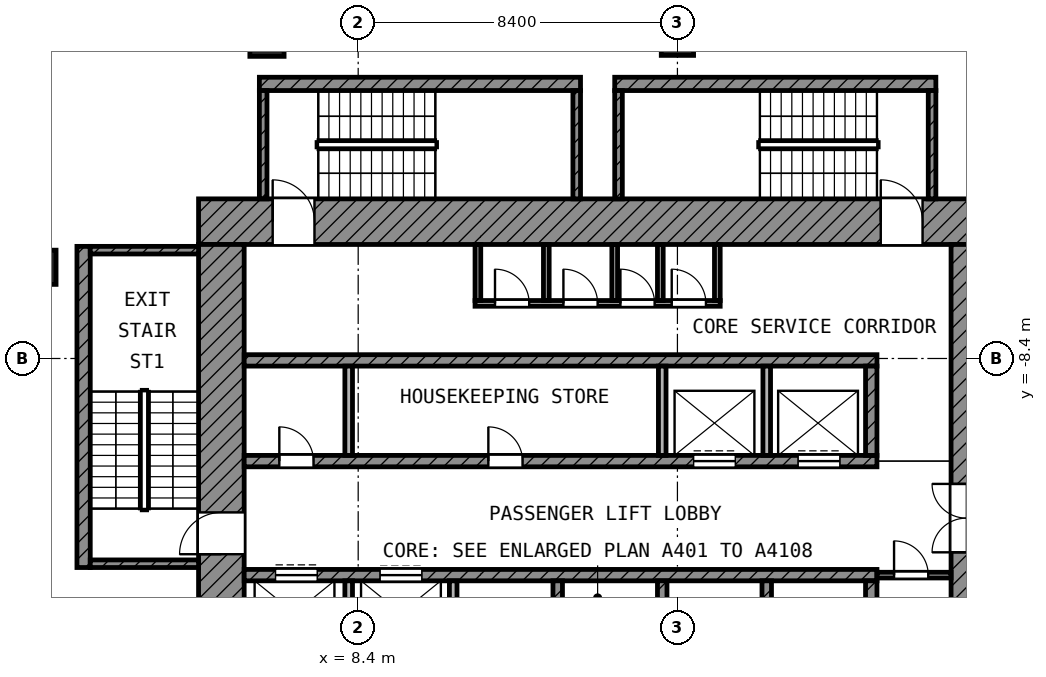
"""IFC4 building model, lengths in metres.
Left out: names, types, materials, properties, quantities, classifications, styles, units other than length and angle.
Written with IfcOpenShell. Run it as: python <this file> out.ifc"""

import sys

from ifc_helpers import new_model, si_unit, direction, frame, frame_2d, origin, origin_2d, place, context, subcontext, project, spatial, rectangle, extrude, element, fill, save


model = new_model("IFC4")
c1 = context("Model", 3, precision=1e-05, world=origin(), true_north=direction((0.0, 1.0)))
c2 = subcontext(c1, "Body", "Model", "MODEL_VIEW")
j1 = project(units=[si_unit("LENGTHUNIT", "METRE"), si_unit("PLANEANGLEUNIT", "RADIAN")], contexts=[c1])
p1 = place(None, origin())
s1 = spatial("IfcSite", under=j1, at=p1, CompositionType="ELEMENT")
p2 = place(p1, origin())
s2 = spatial("IfcBuilding", under=s1, at=p2, CompositionType="ELEMENT")
p3 = place(p2, frame((0.0, 0.0, 243.2)))
s3 = spatial("IfcBuildingStorey", under=s2, at=p3, CompositionType="ELEMENT", Elevation=243.2)
p4 = place(p3, frame((6.0, 0.0, 0.0), z_axis=(0.0, 0.0, 1.0), x_axis=(1.0, 0.0, 0.0)))
e1 = element("IfcColumn", 1, at=p4, inside=s3, PredefinedType="COLUMN", context=c2, shape_type="SweptSolid", body=[
    extrude(rectangle(XDim=0.9, YDim=0.9, at=origin_2d()), origin(), (0.0, 0.0, 1.0), 4.2),
])
p5 = place(p3, frame((16.8, 0.0, 0.0), z_axis=(0.0, 0.0, 1.0), x_axis=(1.0, 0.0, 0.0)))
e2 = element("IfcColumn", 2, at=p5, inside=s3, PredefinedType="COLUMN", context=c2, shape_type="SweptSolid", body=[
    extrude(rectangle(XDim=0.85, YDim=0.85, at=origin_2d()), origin(), (0.0, 0.0, 1.0), 4.2),
])
p6 = place(p3, frame((0.0, -6.0, 0.0), z_axis=(0.0, 0.0, 1.0), x_axis=(1.0, 0.0, 0.0)))
e3 = element("IfcColumn", 3, at=p6, inside=s3, PredefinedType="COLUMN", context=c2, shape_type="SweptSolid", body=[
    extrude(rectangle(XDim=0.9, YDim=0.9, at=origin_2d()), origin(), (0.0, 0.0, 1.0), 4.2),
])
p7 = place(p3, frame((4.2, -4.8, 0.0), z_axis=(0.0, 0.0, 1.0), x_axis=(1.0, 0.0, 0.0)))
e4 = element("IfcWall", 4, at=p7, inside=s3, PredefinedType="SHEAR", context=c2, shape_type="SweptSolid", body=[
    extrude(rectangle(XDim=20.6, YDim=1.2, at=frame_2d((10.3, 0.0))), origin(), (0.0, 0.0, 1.0), 3.6),
])
p8 = place(p7, frame((1.95, 0.0, 0.0)))
e5 = element("IfcOpeningElement", 5, at=p8, cuts=e4, PredefinedType="OPENING", context=c2, shape_type="SweptSolid", body=[
    extrude(rectangle(XDim=1.1, YDim=2.1, at=frame_2d((0.55, 1.05))), frame((0.0, 0.61, 0.0), z_axis=(0.0, -1.0, 0.0), x_axis=(1.0, 0.0, 0.0)), (0.0, 0.0, 1.0), 1.22),
])
p9 = place(p7, frame((17.95, 0.0, 0.0)))
e6 = element("IfcOpeningElement", 6, at=p9, cuts=e4, PredefinedType="OPENING", context=c2, shape_type="SweptSolid", body=[
    extrude(rectangle(XDim=1.1, YDim=2.1, at=frame_2d((0.55, 1.05))), frame((0.0, 0.61, 0.0), z_axis=(0.0, -1.0, 0.0), x_axis=(1.0, 0.0, 0.0)), (0.0, 0.0, 1.0), 1.22),
])
p10 = place(p3, frame((4.8, -24.8, 0.0), z_axis=(0.0, 0.0, 1.0), x_axis=(0.0, 1.0, 0.0)))
e7 = element("IfcWall", 7, at=p10, inside=s3, PredefinedType="SHEAR", context=c2, shape_type="SweptSolid", body=[
    extrude(rectangle(XDim=19.4, YDim=1.2, at=frame_2d((9.7, 0.0))), origin(), (0.0, 0.0, 1.0), 3.6),
])
p11 = place(p10, frame((11.25, 0.0, 0.0)))
e8 = element("IfcOpeningElement", 8, at=p11, cuts=e7, PredefinedType="OPENING", context=c2, shape_type="SweptSolid", body=[
    extrude(rectangle(XDim=1.1, YDim=2.1, at=frame_2d((0.55, 1.05))), frame((0.0, 0.61, 0.0), z_axis=(0.0, -1.0, 0.0), x_axis=(1.0, 0.0, 0.0)), (0.0, 0.0, 1.0), 1.22),
])
p12 = place(p10, frame((1.95, 0.0, 0.0)))
e9 = element("IfcOpeningElement", 9, at=p12, cuts=e7, PredefinedType="OPENING", context=c2, shape_type="SweptSolid", body=[
    extrude(rectangle(XDim=1.1, YDim=2.1, at=frame_2d((0.55, 1.05))), frame((0.0, 0.61, 0.0), z_axis=(0.0, -1.0, 0.0), x_axis=(1.0, 0.0, 0.0)), (0.0, 0.0, 1.0), 1.22),
])
p13 = place(p3, frame((24.4, -24.0, 0.0), z_axis=(0.0, 0.0, 1.0), x_axis=(0.0, 1.0, 0.0)))
e10 = element("IfcWall", 10, at=p13, inside=s3, PredefinedType="SHEAR", context=c2, shape_type="SweptSolid", body=[
    extrude(rectangle(XDim=18.6, YDim=0.8, at=frame_2d((9.3, 0.0))), origin(), (0.0, 0.0, 1.0), 3.6),
])
p14 = place(p13, frame((10.5, 0.0, 0.0)))
e11 = element("IfcOpeningElement", 11, at=p14, cuts=e10, PredefinedType="OPENING", context=c2, shape_type="SweptSolid", body=[
    extrude(rectangle(XDim=1.8, YDim=2.1, at=frame_2d((0.9, 1.05))), frame((0.0, 0.41, 0.0), z_axis=(0.0, -1.0, 0.0), x_axis=(1.0, 0.0, 0.0)), (0.0, 0.0, 1.0), 0.82),
])
p15 = place(p3, frame((5.4, -8.45, 0.0), z_axis=(0.0, 0.0, 1.0), x_axis=(1.0, 0.0, 0.0)))
e12 = element("IfcWall", 12, at=p15, inside=s3, PredefinedType="SHEAR", context=c2, shape_type="SweptSolid", body=[
    extrude(rectangle(XDim=16.65, YDim=0.3, at=frame_2d((8.325, 0.0))), origin(), (0.0, 0.0, 1.0), 3.6),
])
p16 = place(p3, frame((5.4, -11.1, 0.0), z_axis=(0.0, 0.0, 1.0), x_axis=(1.0, 0.0, 0.0)))
e13 = element("IfcWall", 13, at=p16, inside=s3, PredefinedType="SHEAR", context=c2, shape_type="SweptSolid", body=[
    extrude(rectangle(XDim=16.65, YDim=0.3, at=frame_2d((8.325, 0.0))), origin(), (0.0, 0.0, 1.0), 3.6),
])
p17 = place(p16, frame((11.825, 0.0, 0.0)))
e14 = element("IfcOpeningElement", 14, at=p17, cuts=e13, PredefinedType="OPENING", context=c2, shape_type="SweptSolid", body=[
    extrude(rectangle(XDim=1.1, YDim=2.1, at=frame_2d((0.55, 1.05))), frame((0.0, 0.16, 0.0), z_axis=(0.0, -1.0, 0.0), x_axis=(1.0, 0.0, 0.0)), (0.0, 0.0, 1.0), 0.32),
])
p18 = place(p16, frame((14.575, 0.0, 0.0)))
e15 = element("IfcOpeningElement", 15, at=p18, cuts=e13, PredefinedType="OPENING", context=c2, shape_type="SweptSolid", body=[
    extrude(rectangle(XDim=1.1, YDim=2.1, at=frame_2d((0.55, 1.05))), frame((0.0, 0.16, 0.0), z_axis=(0.0, -1.0, 0.0), x_axis=(1.0, 0.0, 0.0)), (0.0, 0.0, 1.0), 0.32),
])
p19 = place(p16, frame((0.925, 0.0, 0.0)))
e16 = element("IfcOpeningElement", 16, at=p19, cuts=e13, PredefinedType="OPENING", context=c2, shape_type="SweptSolid", body=[
    extrude(rectangle(XDim=0.9, YDim=2.1, at=frame_2d((0.45, 1.05))), frame((0.0, 0.16, 0.0), z_axis=(0.0, -1.0, 0.0), x_axis=(1.0, 0.0, 0.0)), (0.0, 0.0, 1.0), 0.32),
])
p20 = place(p16, frame((6.425, 0.0, 0.0)))
e17 = element("IfcOpeningElement", 17, at=p20, cuts=e13, PredefinedType="OPENING", context=c2, shape_type="SweptSolid", body=[
    extrude(rectangle(XDim=0.9, YDim=2.1, at=frame_2d((0.45, 1.05))), frame((0.0, 0.16, 0.0), z_axis=(0.0, -1.0, 0.0), x_axis=(1.0, 0.0, 0.0)), (0.0, 0.0, 1.0), 0.32),
])
p21 = place(p3, frame((5.4, -14.1, 0.0), z_axis=(0.0, 0.0, 1.0), x_axis=(1.0, 0.0, 0.0)))
e18 = element("IfcWall", 18, at=p21, inside=s3, PredefinedType="SHEAR", context=c2, shape_type="SweptSolid", body=[
    extrude(rectangle(XDim=16.65, YDim=0.3, at=frame_2d((8.325, 0.0))), origin(), (0.0, 0.0, 1.0), 3.6),
])
p22 = place(p21, frame((0.825, 0.0, 0.0)))
e19 = element("IfcOpeningElement", 19, at=p22, cuts=e18, PredefinedType="OPENING", context=c2, shape_type="SweptSolid", body=[
    extrude(rectangle(XDim=1.1, YDim=2.1, at=frame_2d((0.55, 1.05))), frame((0.0, 0.16, 0.0), z_axis=(0.0, -1.0, 0.0), x_axis=(1.0, 0.0, 0.0)), (0.0, 0.0, 1.0), 0.32),
])
p23 = place(p21, frame((3.575, 0.0, 0.0)))
e20 = element("IfcOpeningElement", 20, at=p23, cuts=e18, PredefinedType="OPENING", context=c2, shape_type="SweptSolid", body=[
    extrude(rectangle(XDim=1.1, YDim=2.1, at=frame_2d((0.55, 1.05))), frame((0.0, 0.16, 0.0), z_axis=(0.0, -1.0, 0.0), x_axis=(1.0, 0.0, 0.0)), (0.0, 0.0, 1.0), 0.32),
])
p24 = place(p3, frame((21.9, -10.95, 0.0), z_axis=(0.0, 0.0, 1.0), x_axis=(0.0, 1.0, 0.0)))
e21 = element("IfcWall", 21, at=p24, inside=s3, PredefinedType="SHEAR", context=c2, shape_type="SweptSolid", body=[
    extrude(rectangle(XDim=2.35, YDim=0.3, at=frame_2d((1.175, 0.0))), origin(), (0.0, 0.0, 1.0), 3.6),
])
p25 = place(p3, frame((21.9, -16.6, 0.0), z_axis=(0.0, 0.0, 1.0), x_axis=(0.0, 1.0, 0.0)))
e22 = element("IfcWall", 22, at=p25, inside=s3, PredefinedType="SHEAR", context=c2, shape_type="SweptSolid", body=[
    extrude(rectangle(XDim=2.35, YDim=0.3, at=frame_2d((1.175, 0.0))), origin(), (0.0, 0.0, 1.0), 3.6),
])
for number, where, z_axis, x_axis in (
    (23, (8.15, -10.95, 0.0), (0.0, 0.0, 1.0), (0.0, 1.0, 0.0)),
    (24, (16.4, -10.95, 0.0), (0.0, 0.0, 1.0), (0.0, 1.0, 0.0)),
    (25, (19.15, -10.95, 0.0), (0.0, 0.0, 1.0), (0.0, 1.0, 0.0)),
):
    element("IfcWall", number, at=place(p3, frame(where, z_axis=z_axis, x_axis=x_axis)), inside=s3, PredefinedType="PARTITIONING", context=c2, shape_type="SweptSolid", body=[
        extrude(rectangle(XDim=2.35, YDim=0.2, at=frame_2d((1.175, 0.0))), origin(), (0.0, 0.0, 1.0), 3.6),
    ])
for number, where, z_axis, x_axis in (
    (26, (8.15, -16.6, 0.0), (0.0, 0.0, 1.0), (0.0, 1.0, 0.0)),
    (27, (10.9, -16.6, 0.0), (0.0, 0.0, 1.0), (0.0, 1.0, 0.0)),
):
    element("IfcWall", number, at=place(p3, frame(where, z_axis=z_axis, x_axis=x_axis)), inside=s3, PredefinedType="PARTITIONING", context=c2, shape_type="SweptSolid", body=[
        extrude(rectangle(XDim=2.35, YDim=0.2, at=frame_2d((1.175, 0.0))), origin(), (0.0, 0.0, 1.0), 3.6),
    ])
for number, where, z_axis, x_axis in (
    (28, (13.65, -16.6, 0.0), (0.0, 0.0, 1.0), (0.0, 1.0, 0.0)),
    (29, (16.4, -16.6, 0.0), (0.0, 0.0, 1.0), (0.0, 1.0, 0.0)),
    (30, (19.15, -16.6, 0.0), (0.0, 0.0, 1.0), (0.0, 1.0, 0.0)),
):
    element("IfcWall", number, at=place(p3, frame(where, z_axis=z_axis, x_axis=x_axis)), inside=s3, PredefinedType="SHEAR", context=c2, shape_type="SweptSolid", body=[
        extrude(rectangle(XDim=2.35, YDim=0.25, at=frame_2d((1.175, 0.0))), origin(), (0.0, 0.0, 1.0), 3.6),
    ])
p26 = place(p3, frame((22.05, -14.1, 0.0), z_axis=(0.0, 0.0, 1.0), x_axis=(1.0, 0.0, 0.0)))
e31 = element("IfcWall", 31, at=p26, inside=s3, PredefinedType="PARTITIONING", context=c2, shape_type="SweptSolid", body=[
    extrude(rectangle(XDim=1.95, YDim=0.15, at=frame_2d((0.975, 0.0))), origin(), (0.0, 0.0, 1.0), 3.6),
])
p27 = place(p26, frame((0.45, 0.0, 0.0)))
e32 = element("IfcOpeningElement", 32, at=p27, cuts=e31, PredefinedType="OPENING", context=c2, shape_type="SweptSolid", body=[
    extrude(rectangle(XDim=0.9, YDim=2.1, at=frame_2d((0.45, 1.05))), frame((0.0, 0.085, 0.0), z_axis=(0.0, -1.0, 0.0), x_axis=(1.0, 0.0, 0.0)), (0.0, 0.0, 1.0), 0.17),
])
p28 = place(p3, frame((11.475, -6.95, 0.0), z_axis=(0.0, 0.0, 1.0), x_axis=(1.0, 0.0, 0.0)))
e33 = element("IfcWall", 33, at=p28, inside=s3, PredefinedType="PARTITIONING", context=c2, shape_type="SweptSolid", body=[
    extrude(rectangle(XDim=6.45, YDim=0.15, at=frame_2d((3.225, 0.0))), origin(), (0.0, 0.0, 1.0), 3.6),
])
p29 = place(p28, frame((0.525, 0.0, 0.0)))
e34 = element("IfcOpeningElement", 34, at=p29, cuts=e33, PredefinedType="OPENING", context=c2, shape_type="SweptSolid", body=[
    extrude(rectangle(XDim=0.9, YDim=2.1, at=frame_2d((0.45, 1.05))), frame((0.0, 0.085, 0.0), z_axis=(0.0, -1.0, 0.0), x_axis=(1.0, 0.0, 0.0)), (0.0, 0.0, 1.0), 0.17),
])
p30 = place(p28, frame((2.325, 0.0, 0.0)))
e35 = element("IfcOpeningElement", 35, at=p30, cuts=e33, PredefinedType="OPENING", context=c2, shape_type="SweptSolid", body=[
    extrude(rectangle(XDim=0.9, YDim=2.1, at=frame_2d((0.45, 1.05))), frame((0.0, 0.085, 0.0), z_axis=(0.0, -1.0, 0.0), x_axis=(1.0, 0.0, 0.0)), (0.0, 0.0, 1.0), 0.17),
])
p31 = place(p28, frame((3.825, 0.0, 0.0)))
e36 = element("IfcOpeningElement", 36, at=p31, cuts=e33, PredefinedType="OPENING", context=c2, shape_type="SweptSolid", body=[
    extrude(rectangle(XDim=0.9, YDim=2.1, at=frame_2d((0.45, 1.05))), frame((0.0, 0.085, 0.0), z_axis=(0.0, -1.0, 0.0), x_axis=(1.0, 0.0, 0.0)), (0.0, 0.0, 1.0), 0.17),
])
p32 = place(p28, frame((5.175, 0.0, 0.0)))
e37 = element("IfcOpeningElement", 37, at=p32, cuts=e33, PredefinedType="OPENING", context=c2, shape_type="SweptSolid", body=[
    extrude(rectangle(XDim=0.9, YDim=2.1, at=frame_2d((0.45, 1.05))), frame((0.0, 0.085, 0.0), z_axis=(0.0, -1.0, 0.0), x_axis=(1.0, 0.0, 0.0)), (0.0, 0.0, 1.0), 0.17),
])
for number, where, z_axis, x_axis in (
    (38, (11.55, -6.875, 0.0), (0.0, 0.0, 1.0), (0.0, 1.0, 0.0)),
    (39, (13.35, -6.875, 0.0), (0.0, 0.0, 1.0), (0.0, 1.0, 0.0)),
    (40, (15.15, -6.875, 0.0), (0.0, 0.0, 1.0), (0.0, 1.0, 0.0)),
    (41, (16.35, -6.875, 0.0), (0.0, 0.0, 1.0), (0.0, 1.0, 0.0)),
    (42, (17.85, -6.875, 0.0), (0.0, 0.0, 1.0), (0.0, 1.0, 0.0)),
):
    element("IfcWall", number, at=place(p3, frame(where, z_axis=z_axis, x_axis=x_axis)), inside=s3, PredefinedType="PARTITIONING", context=c2, shape_type="SweptSolid", body=[
        extrude(rectangle(XDim=1.475, YDim=0.15, at=frame_2d((0.738, 0.0))), origin(), (0.0, 0.0, 1.0), 3.6),
    ])
p33 = place(p3, frame((1.175, -13.9, 0.0), z_axis=(0.0, 0.0, 1.0), x_axis=(0.0, 1.0, 0.0)))
e43 = element("IfcWall", 43, at=p33, inside=s3, PredefinedType="SHEAR", context=c2, shape_type="SweptSolid", body=[
    extrude(rectangle(XDim=8.45, YDim=0.35, at=frame_2d((4.225, 0.0))), origin(), (0.0, 0.0, 1.0), 3.6),
])
for number, where, z_axis, x_axis in (
    (44, (1.35, -5.55, 0.0), (0.0, 0.0, 1.0), (1.0, 0.0, 0.0)),
    (45, (1.35, -13.8, 0.0), (0.0, 0.0, 1.0), (1.0, 0.0, 0.0)),
):
    element("IfcWall", number, at=place(p3, frame(where, z_axis=z_axis, x_axis=x_axis)), inside=s3, PredefinedType="SHEAR", context=c2, shape_type="SweptSolid", body=[
        extrude(rectangle(XDim=2.85, YDim=0.2, at=frame_2d((1.425, 0.0))), origin(), (0.0, 0.0, 1.0), 3.6),
    ])
p34 = place(p3, frame((5.8, -1.175, 0.0), z_axis=(0.0, 0.0, 1.0), x_axis=(1.0, 0.0, 0.0)))
e46 = element("IfcWall", 46, at=p34, inside=s3, PredefinedType="SHEAR", context=c2, shape_type="SweptSolid", body=[
    extrude(rectangle(XDim=8.45, YDim=0.35, at=frame_2d((4.225, 0.0))), origin(), (0.0, 0.0, 1.0), 3.6),
])
for number, where, z_axis, x_axis in (
    (47, (5.9, -4.2, 0.0), (0.0, 0.0, 1.0), (0.0, 1.0, 0.0)),
    (48, (14.15, -4.2, 0.0), (0.0, 0.0, 1.0), (0.0, 1.0, 0.0)),
):
    element("IfcWall", number, at=place(p3, frame(where, z_axis=z_axis, x_axis=x_axis)), inside=s3, PredefinedType="SHEAR", context=c2, shape_type="SweptSolid", body=[
        extrude(rectangle(XDim=2.85, YDim=0.2, at=frame_2d((1.425, 0.0))), origin(), (0.0, 0.0, 1.0), 3.6),
    ])
p35 = place(p3, frame((15.15, -1.175, 0.0), z_axis=(0.0, 0.0, 1.0), x_axis=(1.0, 0.0, 0.0)))
e49 = element("IfcWall", 49, at=p35, inside=s3, PredefinedType="SHEAR", context=c2, shape_type="SweptSolid", body=[
    extrude(rectangle(XDim=8.45, YDim=0.35, at=frame_2d((4.225, 0.0))), origin(), (0.0, 0.0, 1.0), 3.6),
])
for number, where, z_axis, x_axis in (
    (50, (15.25, -4.2, 0.0), (0.0, 0.0, 1.0), (0.0, 1.0, 0.0)),
    (51, (23.5, -4.2, 0.0), (0.0, 0.0, 1.0), (0.0, 1.0, 0.0)),
):
    element("IfcWall", number, at=place(p3, frame(where, z_axis=z_axis, x_axis=x_axis)), inside=s3, PredefinedType="SHEAR", context=c2, shape_type="SweptSolid", body=[
        extrude(rectangle(XDim=2.85, YDim=0.2, at=frame_2d((1.425, 0.0))), origin(), (0.0, 0.0, 1.0), 3.6),
    ])
p36 = place(p17, origin())
e52 = element("IfcDoor", 52, at=p36, inside=s3, OperationType="DOUBLE_DOOR_SLIDING", PredefinedType="DOOR", context=c2, shape_type="SweptSolid", body=[
    extrude(rectangle(XDim=1.1, YDim=2.1, at=frame_2d((0.55, 1.05))), frame((0.0, 0.025, 0.0), z_axis=(0.0, -1.0, 0.0), x_axis=(1.0, 0.0, 0.0)), (0.0, 0.0, 1.0), 0.05),
])
fill(e14, e52)
p37 = place(p18, origin())
e53 = element("IfcDoor", 53, at=p37, inside=s3, OperationType="DOUBLE_DOOR_SLIDING", PredefinedType="DOOR", context=c2, shape_type="SweptSolid", body=[
    extrude(rectangle(XDim=1.1, YDim=2.1, at=frame_2d((0.55, 1.05))), frame((0.0, 0.025, 0.0), z_axis=(0.0, -1.0, 0.0), x_axis=(1.0, 0.0, 0.0)), (0.0, 0.0, 1.0), 0.05),
])
fill(e15, e53)
p38 = place(p22, origin())
e54 = element("IfcDoor", 54, at=p38, inside=s3, OperationType="DOUBLE_DOOR_SLIDING", PredefinedType="DOOR", context=c2, shape_type="SweptSolid", body=[
    extrude(rectangle(XDim=1.1, YDim=2.1, at=frame_2d((0.55, 1.05))), frame((0.0, 0.025, 0.0), z_axis=(0.0, -1.0, 0.0), x_axis=(1.0, 0.0, 0.0)), (0.0, 0.0, 1.0), 0.05),
])
fill(e19, e54)
p39 = place(p23, origin())
e55 = element("IfcDoor", 55, at=p39, inside=s3, OperationType="DOUBLE_DOOR_SLIDING", PredefinedType="DOOR", context=c2, shape_type="SweptSolid", body=[
    extrude(rectangle(XDim=1.1, YDim=2.1, at=frame_2d((0.55, 1.05))), frame((0.0, 0.025, 0.0), z_axis=(0.0, -1.0, 0.0), x_axis=(1.0, 0.0, 0.0)), (0.0, 0.0, 1.0), 0.05),
])
fill(e20, e55)
p40 = place(p11, origin())
e56 = element("IfcDoor", 56, at=p40, inside=s3, OperationType="SINGLE_SWING_LEFT", PredefinedType="DOOR", context=c2, shape_type="SweptSolid", body=[
    extrude(rectangle(XDim=1.1, YDim=2.1, at=frame_2d((0.55, 1.05))), frame((0.0, 0.025, 0.0), z_axis=(0.0, -1.0, 0.0), x_axis=(1.0, 0.0, 0.0)), (0.0, 0.0, 1.0), 0.05),
])
fill(e8, e56)
p41 = place(p8, origin())
e57 = element("IfcDoor", 57, at=p41, inside=s3, OperationType="SINGLE_SWING_LEFT", PredefinedType="DOOR", context=c2, shape_type="SweptSolid", body=[
    extrude(rectangle(XDim=1.1, YDim=2.1, at=frame_2d((0.55, 1.05))), frame((0.0, 0.025, 0.0), z_axis=(0.0, -1.0, 0.0), x_axis=(1.0, 0.0, 0.0)), (0.0, 0.0, 1.0), 0.05),
])
fill(e5, e57)
p42 = place(p9, origin())
e58 = element("IfcDoor", 58, at=p42, inside=s3, OperationType="SINGLE_SWING_LEFT", PredefinedType="DOOR", context=c2, shape_type="SweptSolid", body=[
    extrude(rectangle(XDim=1.1, YDim=2.1, at=frame_2d((0.55, 1.05))), frame((0.0, 0.025, 0.0), z_axis=(0.0, -1.0, 0.0), x_axis=(1.0, 0.0, 0.0)), (0.0, 0.0, 1.0), 0.05),
])
fill(e6, e58)
p43 = place(p14, origin())
e59 = element("IfcDoor", 59, at=p43, inside=s3, OperationType="DOUBLE_DOOR_SINGLE_SWING", PredefinedType="DOOR", context=c2, shape_type="SweptSolid", body=[
    extrude(rectangle(XDim=1.8, YDim=2.1, at=frame_2d((0.9, 1.05))), frame((0.0, 0.025, 0.0), z_axis=(0.0, -1.0, 0.0), x_axis=(1.0, 0.0, 0.0)), (0.0, 0.0, 1.0), 0.05),
])
fill(e11, e59)
p44 = place(p29, origin())
e60 = element("IfcDoor", 60, at=p44, inside=s3, OperationType="SINGLE_SWING_LEFT", PredefinedType="DOOR", context=c2, shape_type="SweptSolid", body=[
    extrude(rectangle(XDim=0.9, YDim=2.1, at=frame_2d((0.45, 1.05))), frame((0.0, 0.025, 0.0), z_axis=(0.0, -1.0, 0.0), x_axis=(1.0, 0.0, 0.0)), (0.0, 0.0, 1.0), 0.05),
])
fill(e34, e60)
p45 = place(p30, origin())
e61 = element("IfcDoor", 61, at=p45, inside=s3, OperationType="SINGLE_SWING_LEFT", PredefinedType="DOOR", context=c2, shape_type="SweptSolid", body=[
    extrude(rectangle(XDim=0.9, YDim=2.1, at=frame_2d((0.45, 1.05))), frame((0.0, 0.025, 0.0), z_axis=(0.0, -1.0, 0.0), x_axis=(1.0, 0.0, 0.0)), (0.0, 0.0, 1.0), 0.05),
])
fill(e35, e61)
p46 = place(p31, origin())
e62 = element("IfcDoor", 62, at=p46, inside=s3, OperationType="SINGLE_SWING_LEFT", PredefinedType="DOOR", context=c2, shape_type="SweptSolid", body=[
    extrude(rectangle(XDim=0.9, YDim=2.1, at=frame_2d((0.45, 1.05))), frame((0.0, 0.025, 0.0), z_axis=(0.0, -1.0, 0.0), x_axis=(1.0, 0.0, 0.0)), (0.0, 0.0, 1.0), 0.05),
])
fill(e36, e62)
p47 = place(p32, origin())
e63 = element("IfcDoor", 63, at=p47, inside=s3, OperationType="SINGLE_SWING_LEFT", PredefinedType="DOOR", context=c2, shape_type="SweptSolid", body=[
    extrude(rectangle(XDim=0.9, YDim=2.1, at=frame_2d((0.45, 1.05))), frame((0.0, 0.025, 0.0), z_axis=(0.0, -1.0, 0.0), x_axis=(1.0, 0.0, 0.0)), (0.0, 0.0, 1.0), 0.05),
])
fill(e37, e63)
p48 = place(p27, origin())
e64 = element("IfcDoor", 64, at=p48, inside=s3, OperationType="SINGLE_SWING_LEFT", PredefinedType="DOOR", context=c2, shape_type="SweptSolid", body=[
    extrude(rectangle(XDim=0.9, YDim=2.1, at=frame_2d((0.45, 1.05))), frame((0.0, 0.025, 0.0), z_axis=(0.0, -1.0, 0.0), x_axis=(1.0, 0.0, 0.0)), (0.0, 0.0, 1.0), 0.05),
])
fill(e32, e64)
p49 = place(p19, origin())
e65 = element("IfcDoor", 65, at=p49, inside=s3, OperationType="SINGLE_SWING_LEFT", PredefinedType="DOOR", context=c2, shape_type="SweptSolid", body=[
    extrude(rectangle(XDim=0.9, YDim=2.1, at=frame_2d((0.45, 1.05))), frame((0.0, 0.025, 0.0), z_axis=(0.0, -1.0, 0.0), x_axis=(1.0, 0.0, 0.0)), (0.0, 0.0, 1.0), 0.05),
])
fill(e16, e65)
p50 = place(p20, origin())
e66 = element("IfcDoor", 66, at=p50, inside=s3, OperationType="SINGLE_SWING_LEFT", PredefinedType="DOOR", context=c2, shape_type="SweptSolid", body=[
    extrude(rectangle(XDim=0.9, YDim=2.1, at=frame_2d((0.45, 1.05))), frame((0.0, 0.025, 0.0), z_axis=(0.0, -1.0, 0.0), x_axis=(1.0, 0.0, 0.0)), (0.0, 0.0, 1.0), 0.05),
])
fill(e17, e66)
save(model, sys.argv[1])
